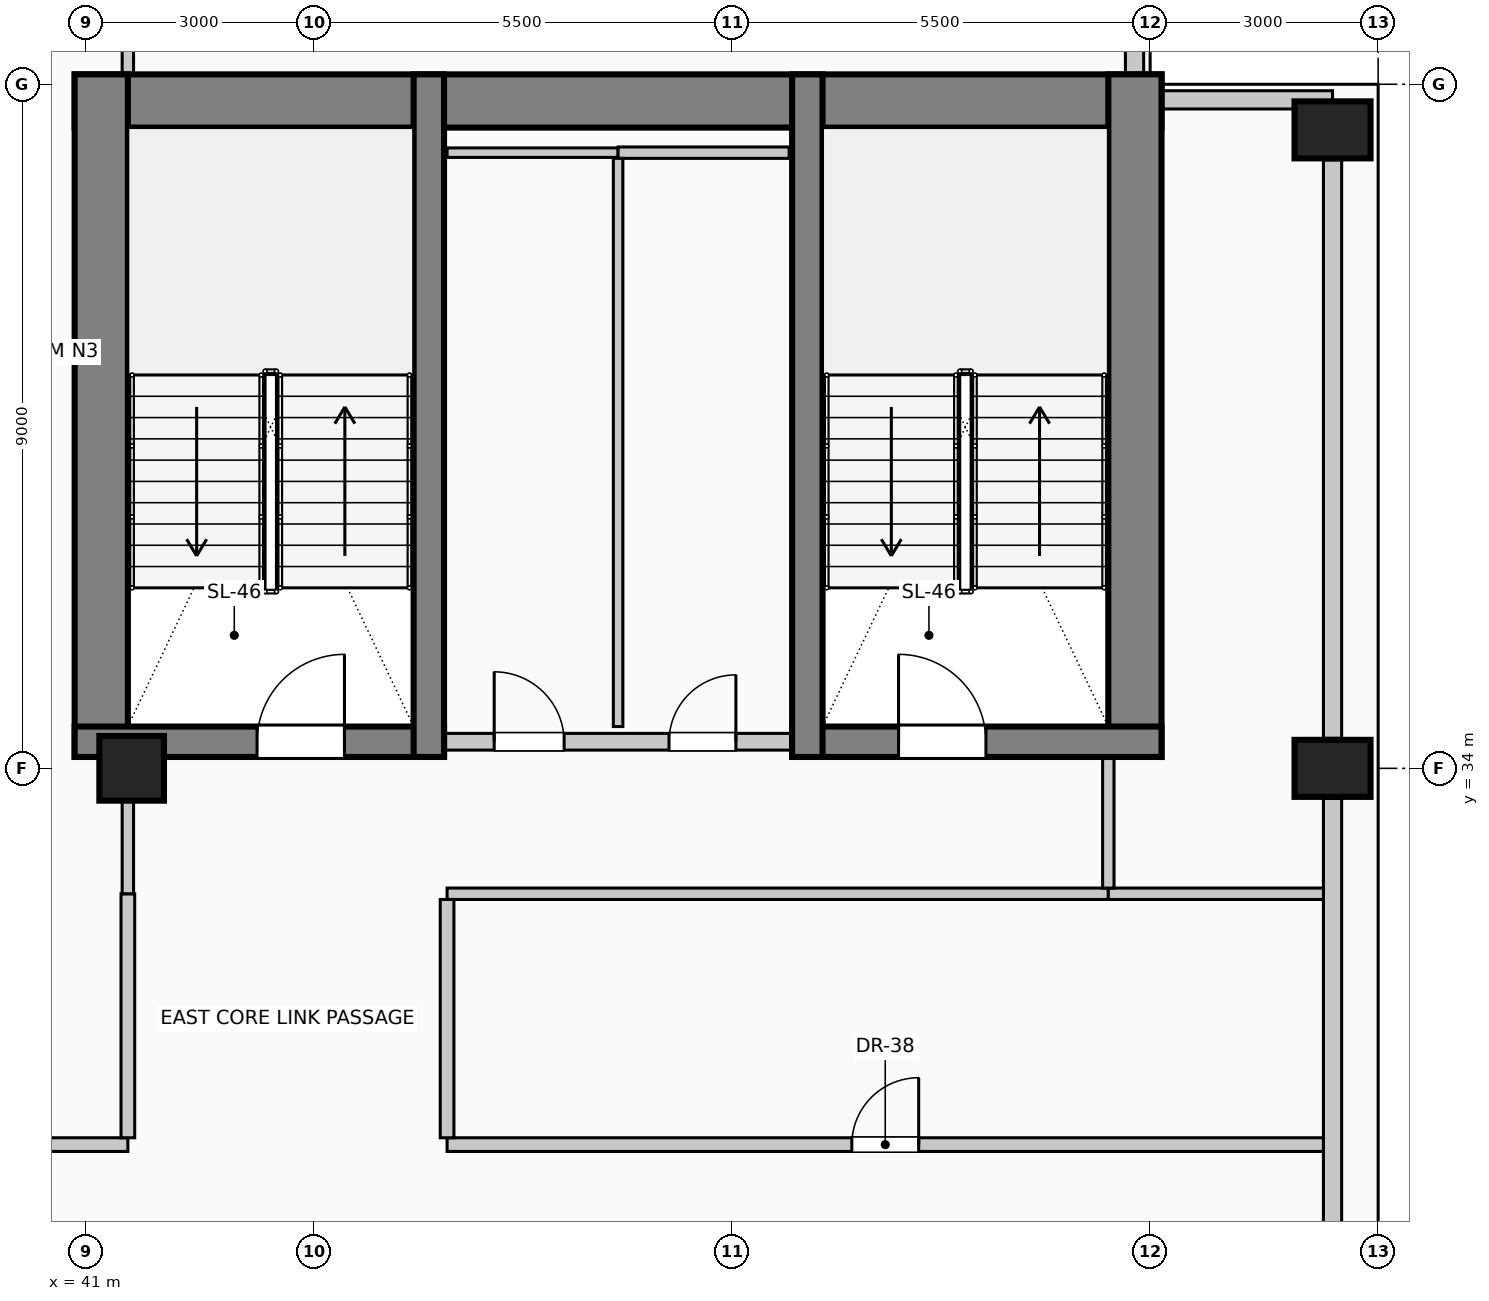
"""IFC4 building model, lengths in metres.
Left out: names, types, materials, properties, quantities, classifications, styles, units other than length and angle.
Written with IfcOpenShell. Run it as: python <this file> out.ifc"""

import sys

from ifc_helpers import new_model, si_unit, direction, frame, frame_2d, origin, origin_2d, place, context, subcontext, project, spatial, rectangle, circle, extrude, element, fill, save


model = new_model("IFC4")
c1 = context("Model", 3, precision=1e-05, world=origin(), true_north=direction((0.0, 1.0)))
c2 = subcontext(c1, "Body", "Model", "MODEL_VIEW")
j1 = project(units=[si_unit("LENGTHUNIT", "METRE"), si_unit("PLANEANGLEUNIT", "RADIAN")], contexts=[c1])
p1 = place(None, origin())
s1 = spatial("IfcSite", under=j1, at=p1, CompositionType="ELEMENT")
p2 = place(p1, origin())
s2 = spatial("IfcBuilding", under=s1, at=p2, CompositionType="ELEMENT")
p3 = place(p2, frame((0.0, 0.0, 264.6)))
s3 = spatial("IfcBuildingStorey", under=s2, at=p3, CompositionType="ELEMENT", Elevation=264.6)
p4 = place(p3, frame((40.85, 42.78, 0.0), z_axis=(0.0, 0.0, 1.0), x_axis=(1.0, 0.0, 0.0)))
e1 = element("IfcWall", 1, at=p4, inside=s3, PredefinedType="SHEAR", context=c2, shape_type="SweptSolid", body=[
    extrude(rectangle(XDim=14.3, YDim=0.7, at=frame_2d((7.15, 0.0))), origin(), (0.0, 0.0, 1.0), 4.0),
])
for number, where, z_axis, x_axis in (
    (2, (41.2, 34.15, 0.0), (0.0, 0.0, 1.0), (0.0, 1.0, 0.0)),
    (3, (54.8, 34.15, 0.0), (0.0, 0.0, 1.0), (0.0, 1.0, 0.0)),
):
    element("IfcWall", number, at=place(p3, frame(where, z_axis=z_axis, x_axis=x_axis)), inside=s3, PredefinedType="SHEAR", context=c2, shape_type="SweptSolid", body=[
        extrude(rectangle(XDim=8.98, YDim=0.7, at=frame_2d((4.49, 0.0))), origin(), (0.0, 0.0, 1.0), 4.0),
    ])
p5 = place(p3, frame((40.85, 34.35, 0.0), z_axis=(0.0, 0.0, 1.0), x_axis=(1.0, 0.0, 0.0)))
e4 = element("IfcWall", 4, at=p5, inside=s3, PredefinedType="SHEAR", context=c2, shape_type="SweptSolid", body=[
    extrude(rectangle(XDim=4.86, YDim=0.4, at=frame_2d((2.43, 0.0))), origin(), (0.0, 0.0, 1.0), 4.0),
])
p6 = place(p5, frame((2.4, 0.0, 0.0)))
e5 = element("IfcOpeningElement", 5, at=p6, cuts=e4, PredefinedType="OPENING", context=c2, shape_type="SweptSolid", body=[
    extrude(rectangle(XDim=1.15, YDim=2.2, at=frame_2d((0.575, 1.1))), frame((0.0, 0.21, 0.0), z_axis=(0.0, -1.0, 0.0), x_axis=(1.0, 0.0, 0.0)), (0.0, 0.0, 1.0), 0.42),
])
p7 = place(p3, frame((45.51, 34.15, 0.0), z_axis=(0.0, 0.0, 1.0), x_axis=(0.0, 1.0, 0.0)))
e6 = element("IfcWall", 6, at=p7, inside=s3, PredefinedType="SHEAR", context=c2, shape_type="SweptSolid", body=[
    extrude(rectangle(XDim=8.98, YDim=0.4, at=frame_2d((4.49, 0.0))), origin(), (0.0, 0.0, 1.0), 4.0),
])
p8 = place(p3, frame((50.29, 34.35, 0.0), z_axis=(0.0, 0.0, 1.0), x_axis=(1.0, 0.0, 0.0)))
e7 = element("IfcWall", 7, at=p8, inside=s3, PredefinedType="SHEAR", context=c2, shape_type="SweptSolid", body=[
    extrude(rectangle(XDim=4.86, YDim=0.4, at=frame_2d((2.43, 0.0))), origin(), (0.0, 0.0, 1.0), 4.0),
])
p9 = place(p8, frame((1.4, 0.0, 0.0)))
e8 = element("IfcOpeningElement", 8, at=p9, cuts=e7, PredefinedType="OPENING", context=c2, shape_type="SweptSolid", body=[
    extrude(rectangle(XDim=1.15, YDim=2.2, at=frame_2d((0.575, 1.1))), frame((0.0, 0.21, 0.0), z_axis=(0.0, -1.0, 0.0), x_axis=(1.0, 0.0, 0.0)), (0.0, 0.0, 1.0), 0.42),
])
p10 = place(p3, frame((50.49, 34.15, 0.0), z_axis=(0.0, 0.0, 1.0), x_axis=(0.0, 1.0, 0.0)))
e9 = element("IfcWall", 9, at=p10, inside=s3, PredefinedType="SHEAR", context=c2, shape_type="SweptSolid", body=[
    extrude(rectangle(XDim=8.98, YDim=0.4, at=frame_2d((4.49, 0.0))), origin(), (0.0, 0.0, 1.0), 4.0),
])
for number, where, z_axis, x_axis in (
    (10, (57.4, 34.0, 0.0), (0.0, 0.0, 1.0), (0.0, 1.0, 0.0)),
    (11, (57.4, 42.4, 0.0), (0.0, 0.0, 1.0), (0.0, 1.0, 0.0)),
):
    element("IfcColumn", number, at=place(p3, frame(where, z_axis=z_axis, x_axis=x_axis)), inside=s3, PredefinedType="COLUMN", context=c2, shape_type="SweptSolid", body=[
        extrude(rectangle(XDim=0.75, YDim=1.0, at=origin_2d()), origin(), (0.0, 0.0, 1.0), 4.0),
    ])
p11 = place(p3, frame((41.6, 34.0, 0.0), z_axis=(0.0, 0.0, 1.0), x_axis=(1.0, 0.0, 0.0)))
e12 = element("IfcColumn", 12, at=p11, inside=s3, PredefinedType="COLUMN", context=c2, shape_type="SweptSolid", body=[
    extrude(circle(Radius=0.425, at=origin_2d()), origin(), (0.0, 0.0, 1.0), 4.0),
])
p12 = place(p3, frame((57.4, 33.605, 0.0), z_axis=(0.0, 0.0, 1.0), x_axis=(0.0, -1.0, 0.0)))
e13 = element("IfcWall", 13, at=p12, inside=s3, PredefinedType="SOLIDWALL", context=c2, shape_type="SweptSolid", body=[
    extrude(rectangle(XDim=7.21, YDim=0.24, at=frame_2d((3.605, 0.0))), origin(), (0.0, 0.0, 1.0), 3.0),
])
p13 = place(p3, frame((57.4, 42.005, 0.0), z_axis=(0.0, 0.0, 1.0), x_axis=(0.0, -1.0, 0.0)))
e14 = element("IfcWall", 14, at=p13, inside=s3, PredefinedType="SOLIDWALL", context=c2, shape_type="SweptSolid", body=[
    extrude(rectangle(XDim=7.61, YDim=0.24, at=frame_2d((3.805, 0.0))), origin(), (0.0, 0.0, 1.0), 3.0),
])
p14 = place(p3, frame((54.795, 45.4, 0.0), z_axis=(0.0, 0.0, 1.0), x_axis=(0.0, -1.0, 0.0)))
e15 = element("IfcWall", 15, at=p14, inside=s3, PredefinedType="SOLIDWALL", context=c2, shape_type="SweptSolid", body=[
    extrude(rectangle(XDim=2.265, YDim=0.24, at=frame_2d((1.132, 0.0))), origin(), (0.0, 0.0, 1.0), 3.75),
])
p15 = place(p3, frame((55.155, 42.795, 0.0), z_axis=(0.0, 0.0, 1.0), x_axis=(1.0, 0.0, 0.0)))
e16 = element("IfcWall", 16, at=p15, inside=s3, PredefinedType="SOLIDWALL", context=c2, shape_type="SweptSolid", body=[
    extrude(rectangle(XDim=2.245, YDim=0.24, at=frame_2d((1.123, 0.0))), origin(), (0.0, 0.0, 1.0), 3.75),
])
p16 = place(p3, frame((45.72, 34.35, 0.0), z_axis=(0.0, 0.0, 1.0), x_axis=(1.0, 0.0, 0.0)))
e17 = element("IfcWall", 17, at=p16, inside=s3, PredefinedType="PARTITIONING", context=c2, shape_type="SweptSolid", body=[
    extrude(rectangle(XDim=4.56, YDim=0.22, at=frame_2d((2.28, 0.0))), origin(), (0.0, 0.0, 1.0), 3.75),
])
p17 = place(p16, frame((0.65, 0.0, 0.0)))
e18 = element("IfcOpeningElement", 18, at=p17, cuts=e17, PredefinedType="OPENING", context=c2, shape_type="SweptSolid", body=[
    extrude(rectangle(XDim=0.92, YDim=2.1, at=frame_2d((0.46, 1.05))), frame((0.0, 0.12, 0.0), z_axis=(0.0, -1.0, 0.0), x_axis=(1.0, 0.0, 0.0)), (0.0, 0.0, 1.0), 0.24),
])
p18 = place(p16, frame((2.95, 0.0, 0.0)))
e19 = element("IfcOpeningElement", 19, at=p18, cuts=e17, PredefinedType="OPENING", context=c2, shape_type="SweptSolid", body=[
    extrude(rectangle(XDim=0.88, YDim=2.1, at=frame_2d((0.44, 1.05))), frame((0.0, 0.12, 0.0), z_axis=(0.0, -1.0, 0.0), x_axis=(1.0, 0.0, 0.0)), (0.0, 0.0, 1.0), 0.24),
])
p19 = place(p3, frame((34.42, 29.05, 0.0), z_axis=(0.0, 0.0, 1.0), x_axis=(1.0, 0.0, 0.0)))
e20 = element("IfcWall", 20, at=p19, inside=s3, PredefinedType="PARTITIONING", context=c2, shape_type="SweptSolid", body=[
    extrude(rectangle(XDim=7.13, YDim=0.18, at=frame_2d((3.565, 0.0))), origin(), (0.0, 0.0, 1.0), 3.75),
])
p20 = place(p19, frame((3.09, 0.0, 0.0)))
e21 = element("IfcOpeningElement", 21, at=p20, cuts=e20, PredefinedType="OPENING", context=c2, shape_type="SweptSolid", body=[
    extrude(rectangle(XDim=0.95, YDim=2.15, at=frame_2d((0.475, 1.075))), frame((0.0, 0.1, 0.0), z_axis=(0.0, -1.0, 0.0), x_axis=(1.0, 0.0, 0.0)), (0.0, 0.0, 1.0), 0.2),
])
p21 = place(p3, frame((45.75, 29.05, 0.0), z_axis=(0.0, 0.0, 1.0), x_axis=(1.0, 0.0, 0.0)))
e22 = element("IfcWall", 22, at=p21, inside=s3, PredefinedType="PARTITIONING", context=c2, shape_type="SweptSolid", body=[
    extrude(rectangle(XDim=11.53, YDim=0.18, at=frame_2d((5.765, 0.0))), origin(), (0.0, 0.0, 1.0), 3.75),
])
p22 = place(p21, frame((5.325, 0.0, 0.0)))
e23 = element("IfcOpeningElement", 23, at=p22, cuts=e22, PredefinedType="OPENING", context=c2, shape_type="SweptSolid", body=[
    extrude(rectangle(XDim=0.88, YDim=2.1, at=frame_2d((0.44, 1.05))), frame((0.0, 0.1, 0.0), z_axis=(0.0, -1.0, 0.0), x_axis=(1.0, 0.0, 0.0)), (0.0, 0.0, 1.0), 0.2),
])
p23 = place(p3, frame((45.75, 32.35, 0.0), z_axis=(0.0, 0.0, 1.0), x_axis=(1.0, 0.0, 0.0)))
e24 = element("IfcWall", 24, at=p23, inside=s3, PredefinedType="PARTITIONING", context=c2, shape_type="SweptSolid", body=[
    extrude(rectangle(XDim=8.7, YDim=0.15, at=frame_2d((4.35, 0.0))), origin(), (0.0, 0.0, 1.0), 3.75),
])
p24 = place(p3, frame((54.45, 32.35, 0.0), z_axis=(0.0, 0.0, 1.0), x_axis=(1.0, 0.0, 0.0)))
e25 = element("IfcWall", 25, at=p24, inside=s3, PredefinedType="PARTITIONING", context=c2, shape_type="SweptSolid", body=[
    extrude(rectangle(XDim=2.83, YDim=0.15, at=frame_2d((1.415, 0.0))), origin(), (0.0, 0.0, 1.0), 3.75),
])
p25 = place(p3, frame((45.75, 42.1, 0.0), z_axis=(0.0, 0.0, 1.0), x_axis=(1.0, 0.0, 0.0)))
e26 = element("IfcWall", 26, at=p25, inside=s3, PredefinedType="PARTITIONING", context=c2, shape_type="SweptSolid", body=[
    extrude(rectangle(XDim=2.25, YDim=0.125, at=frame_2d((1.125, 0.0))), origin(), (0.0, 0.0, 1.0), 3.75),
])
p26 = place(p3, frame((48.0, 42.1, 0.0), z_axis=(0.0, 0.0, 1.0), x_axis=(1.0, 0.0, 0.0)))
e27 = element("IfcWall", 27, at=p26, inside=s3, PredefinedType="PARTITIONING", context=c2, shape_type="SweptSolid", body=[
    extrude(rectangle(XDim=2.25, YDim=0.15, at=frame_2d((1.125, 0.0))), origin(), (0.0, 0.0, 1.0), 3.75),
])
p27 = place(p3, frame((41.55, 29.14, 0.0), z_axis=(0.0, 0.0, 1.0), x_axis=(0.0, 1.0, 0.0)))
e28 = element("IfcWall", 28, at=p27, inside=s3, PredefinedType="PARTITIONING", context=c2, shape_type="SweptSolid", body=[
    extrude(rectangle(XDim=3.21, YDim=0.18, at=frame_2d((1.605, 0.0))), origin(), (0.0, 0.0, 1.0), 3.195),
])
p28 = place(p3, frame((41.55, 32.35, 0.0), z_axis=(0.0, 0.0, 1.0), x_axis=(0.0, 1.0, 0.0)))
e29 = element("IfcWall", 29, at=p28, inside=s3, PredefinedType="PARTITIONING", context=c2, shape_type="SweptSolid", body=[
    extrude(rectangle(XDim=1.225, YDim=0.15, at=frame_2d((0.612, 0.0))), origin(), (0.0, 0.0, 1.0), 3.195),
])
p29 = place(p3, frame((41.55, 43.13, 0.0), z_axis=(0.0, 0.0, 1.0), x_axis=(0.0, 1.0, 0.0)))
e30 = element("IfcWall", 30, at=p29, inside=s3, PredefinedType="PARTITIONING", context=c2, shape_type="SweptSolid", body=[
    extrude(rectangle(XDim=1.62, YDim=0.15, at=frame_2d((0.81, 0.0))), origin(), (0.0, 0.0, 1.0), 3.75),
])
p30 = place(p3, frame((45.75, 29.14, 0.0), z_axis=(0.0, 0.0, 1.0), x_axis=(0.0, 1.0, 0.0)))
e31 = element("IfcWall", 31, at=p30, inside=s3, PredefinedType="PARTITIONING", context=c2, shape_type="SweptSolid", body=[
    extrude(rectangle(XDim=3.135, YDim=0.18, at=frame_2d((1.567, 0.0))), origin(), (0.0, 0.0, 1.0), 3.75),
])
p31 = place(p3, frame((48.0, 34.55, 0.0), z_axis=(0.0, 0.0, 1.0), x_axis=(0.0, 1.0, 0.0)))
e32 = element("IfcWall", 32, at=p31, inside=s3, PredefinedType="PARTITIONING", context=c2, shape_type="SweptSolid", body=[
    extrude(rectangle(XDim=7.475, YDim=0.125, at=frame_2d((3.737, 0.0))), origin(), (0.0, 0.0, 1.0), 3.75),
])
p32 = place(p3, frame((54.45, 32.425, 0.0), z_axis=(0.0, 0.0, 1.0), x_axis=(0.0, 1.0, 0.0)))
e33 = element("IfcWall", 33, at=p32, inside=s3, PredefinedType="PARTITIONING", context=c2, shape_type="SweptSolid", body=[
    extrude(rectangle(XDim=1.725, YDim=0.15, at=frame_2d((0.862, 0.0))), origin(), (0.0, 0.0, 1.0), 3.75),
])
p33 = place(p6, origin())
e34 = element("IfcDoor", 34, at=p33, inside=s3, OperationType="SINGLE_SWING_RIGHT", PredefinedType="DOOR", context=c2, shape_type="SweptSolid", body=[
    extrude(rectangle(XDim=1.15, YDim=2.2, at=frame_2d((0.575, 1.1))), frame((0.0, 0.025, 0.0), z_axis=(0.0, -1.0, 0.0), x_axis=(1.0, 0.0, 0.0)), (0.0, 0.0, 1.0), 0.05),
])
fill(e5, e34)
p34 = place(p17, origin())
e35 = element("IfcDoor", 35, at=p34, inside=s3, OperationType="SINGLE_SWING_LEFT", PredefinedType="DOOR", context=c2, shape_type="SweptSolid", body=[
    extrude(rectangle(XDim=0.92, YDim=2.1, at=frame_2d((0.46, 1.05))), frame((0.0, 0.025, 0.0), z_axis=(0.0, -1.0, 0.0), x_axis=(1.0, 0.0, 0.0)), (0.0, 0.0, 1.0), 0.05),
])
fill(e18, e35)
p35 = place(p18, origin())
e36 = element("IfcDoor", 36, at=p35, inside=s3, OperationType="SINGLE_SWING_RIGHT", PredefinedType="DOOR", context=c2, shape_type="SweptSolid", body=[
    extrude(rectangle(XDim=0.88, YDim=2.1, at=frame_2d((0.44, 1.05))), frame((0.0, 0.025, 0.0), z_axis=(0.0, -1.0, 0.0), x_axis=(1.0, 0.0, 0.0)), (0.0, 0.0, 1.0), 0.05),
])
fill(e19, e36)
p36 = place(p9, origin())
e37 = element("IfcDoor", 37, at=p36, inside=s3, OperationType="SINGLE_SWING_LEFT", PredefinedType="DOOR", context=c2, shape_type="SweptSolid", body=[
    extrude(rectangle(XDim=1.15, YDim=2.2, at=frame_2d((0.575, 1.1))), frame((0.0, 0.025, 0.0), z_axis=(0.0, -1.0, 0.0), x_axis=(1.0, 0.0, 0.0)), (0.0, 0.0, 1.0), 0.05),
])
fill(e8, e37)
p37 = place(p22, origin())
e38 = element("IfcDoor", 38, at=p37, inside=s3, OperationType="SINGLE_SWING_RIGHT", PredefinedType="DOOR", context=c2, shape_type="SweptSolid", body=[
    extrude(rectangle(XDim=0.88, YDim=2.1, at=frame_2d((0.44, 1.05))), frame((0.0, 0.025, 0.0), z_axis=(0.0, -1.0, 0.0), x_axis=(1.0, 0.0, 0.0)), (0.0, 0.0, 1.0), 0.05),
])
fill(e23, e38)
save(model, sys.argv[1])
